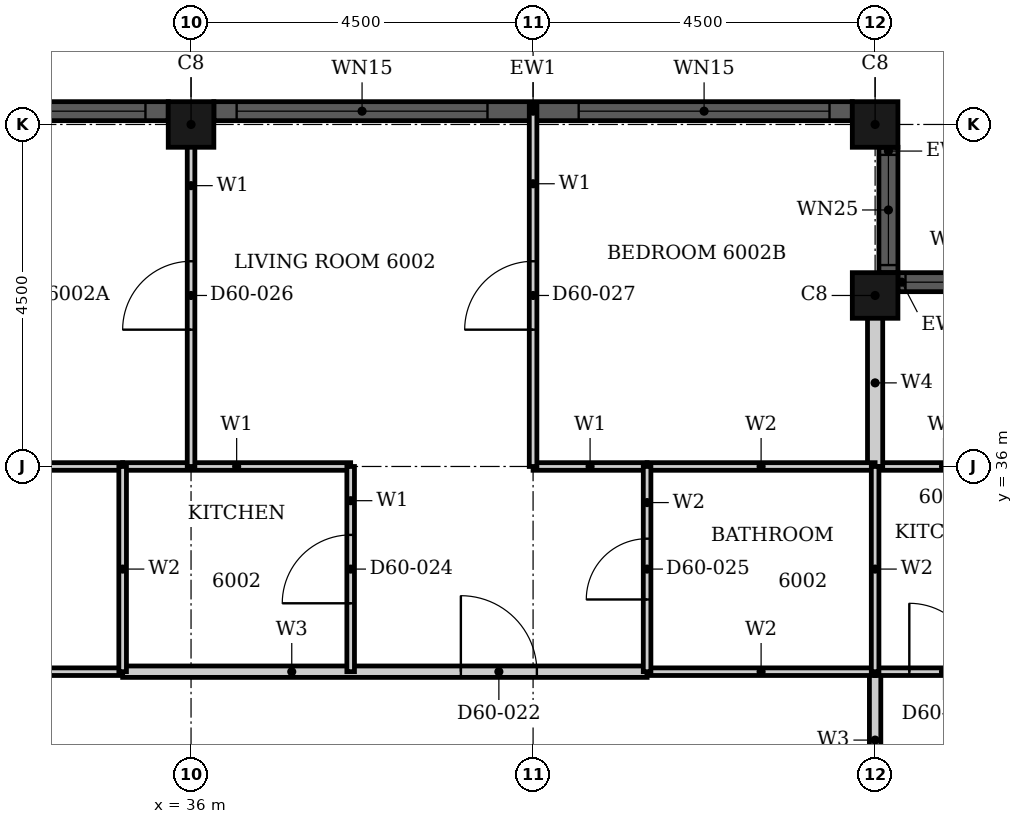
"""IFC4 building model, lengths in metres.
Left out: names, types, materials, properties, quantities, classifications, styles, units other than length and angle.
Written with IfcOpenShell. Run it as: python <this file> out.ifc"""

import sys

from ifc_helpers import new_model, si_unit, direction, frame, frame_2d, origin, origin_2d, place, context, subcontext, project, spatial, rectangle, hollow_rectangle, extrude, element, fill, save


model = new_model("IFC4")
c1 = context("Model", 3, precision=1e-05, world=origin(), true_north=direction((0.0, 1.0)))
c2 = subcontext(c1, "Body", "Model", "MODEL_VIEW")
j1 = project(units=[si_unit("LENGTHUNIT", "METRE"), si_unit("PLANEANGLEUNIT", "RADIAN")], contexts=[c1])
p1 = place(None, origin())
s1 = spatial("IfcSite", under=j1, at=p1, CompositionType="ELEMENT")
p2 = place(p1, origin())
s2 = spatial("IfcBuilding", under=s1, at=p2, CompositionType="ELEMENT")
p3 = place(p2, frame((0.0, 0.0, 237.9)))
s3 = spatial("IfcBuildingStorey", under=s2, at=p3, CompositionType="ELEMENT", Elevation=237.9)
for number, where, z_axis, x_axis in (
    (1, (45.0, 38.25, 0.0), (0.0, 0.0, 1.0), (1.0, 0.0, 0.0)),
    (2, (45.0, 40.5, 0.0), (0.0, 0.0, 1.0), (1.0, 0.0, 0.0)),
    (3, (36.0, 40.5, 0.0), (0.0, 0.0, 1.0), (1.0, 0.0, 0.0)),
):
    element("IfcColumn", number, at=place(p3, frame(where, z_axis=z_axis, x_axis=x_axis)), inside=s3, PredefinedType="COLUMN", context=c2, shape_type="SweptSolid", body=[
        extrude(hollow_rectangle(XDim=0.6, YDim=0.6, WallThickness=0.02, at=origin_2d()), origin(), (0.0, 0.0, 1.0), 3.7),
    ])
p4 = place(p3, frame((46.95, 38.425, 0.0), z_axis=(0.0, 0.0, 1.0), x_axis=(-1.0, 0.0, 0.0)))
e4 = element("IfcWall", 4, at=p4, inside=s3, PredefinedType="SOLIDWALL", context=c2, shape_type="SweptSolid", body=[
    extrude(rectangle(XDim=1.65, YDim=0.25, at=frame_2d((0.825, 0.0))), origin(), (0.0, 0.0, 1.0), 3.7),
])
p5 = place(p4, frame((0.1, 0.0, 0.9)))
e5 = element("IfcOpeningElement", 5, at=p5, cuts=e4, PredefinedType="OPENING", context=c2, shape_type="SweptSolid", body=[
    extrude(rectangle(XDim=1.45, YDim=1.85, at=frame_2d((0.725, 0.925))), frame((0.0, 0.135, 0.0), z_axis=(0.0, -1.0, 0.0), x_axis=(1.0, 0.0, 0.0)), (0.0, 0.0, 1.0), 0.27),
])
p6 = place(p3, frame((45.175, 38.55, 0.0), z_axis=(0.0, 0.0, 1.0), x_axis=(0.0, 1.0, 0.0)))
e6 = element("IfcWall", 6, at=p6, inside=s3, PredefinedType="SOLIDWALL", context=c2, shape_type="SweptSolid", body=[
    extrude(rectangle(XDim=1.65, YDim=0.25, at=frame_2d((0.825, 0.0))), origin(), (0.0, 0.0, 1.0), 3.7),
])
p7 = place(p6, frame((0.1, 0.0, 0.9)))
e7 = element("IfcOpeningElement", 7, at=p7, cuts=e6, PredefinedType="OPENING", context=c2, shape_type="SweptSolid", body=[
    extrude(rectangle(XDim=1.45, YDim=1.85, at=frame_2d((0.725, 0.925))), frame((0.0, 0.135, 0.0), z_axis=(0.0, -1.0, 0.0), x_axis=(1.0, 0.0, 0.0)), (0.0, 0.0, 1.0), 0.27),
])
p8 = place(p3, frame((44.7, 40.675, 0.0), z_axis=(0.0, 0.0, 1.0), x_axis=(-1.0, 0.0, 0.0)))
e8 = element("IfcWall", 8, at=p8, inside=s3, PredefinedType="SOLIDWALL", context=c2, shape_type="SweptSolid", body=[
    extrude(rectangle(XDim=8.4, YDim=0.25, at=frame_2d((4.2, 0.0))), origin(), (0.0, 0.0, 1.0), 3.7),
])
p9 = place(p8, frame((0.3, 0.0, 0.45)))
e9 = element("IfcOpeningElement", 9, at=p9, cuts=e8, PredefinedType="OPENING", context=c2, shape_type="SweptSolid", body=[
    extrude(rectangle(XDim=3.3, YDim=2.3, at=frame_2d((1.65, 1.15))), frame((0.0, 0.135, 0.0), z_axis=(0.0, -1.0, 0.0), x_axis=(1.0, 0.0, 0.0)), (0.0, 0.0, 1.0), 0.27),
])
p10 = place(p8, frame((4.8, 0.0, 0.45)))
e10 = element("IfcOpeningElement", 10, at=p10, cuts=e8, PredefinedType="OPENING", context=c2, shape_type="SweptSolid", body=[
    extrude(rectangle(XDim=3.3, YDim=2.3, at=frame_2d((1.65, 1.15))), frame((0.0, 0.135, 0.0), z_axis=(0.0, -1.0, 0.0), x_axis=(1.0, 0.0, 0.0)), (0.0, 0.0, 1.0), 0.27),
])
p11 = place(p3, frame((35.7, 40.675, 0.0), z_axis=(0.0, 0.0, 1.0), x_axis=(-1.0, 0.0, 0.0)))
e11 = element("IfcWall", 11, at=p11, inside=s3, PredefinedType="SOLIDWALL", context=c2, shape_type="SweptSolid", body=[
    extrude(rectangle(XDim=8.4, YDim=0.25, at=frame_2d((4.2, 0.0))), origin(), (0.0, 0.0, 1.0), 3.7),
])
p12 = place(p11, frame((0.3, 0.0, 0.45)))
e12 = element("IfcOpeningElement", 12, at=p12, cuts=e11, PredefinedType="OPENING", context=c2, shape_type="SweptSolid", body=[
    extrude(rectangle(XDim=3.3, YDim=2.3, at=frame_2d((1.65, 1.15))), frame((0.0, 0.135, 0.0), z_axis=(0.0, -1.0, 0.0), x_axis=(1.0, 0.0, 0.0)), (0.0, 0.0, 1.0), 0.27),
])
p13 = place(p11, frame((4.8, 0.0, 0.45)))
e13 = element("IfcOpeningElement", 13, at=p13, cuts=e11, PredefinedType="OPENING", context=c2, shape_type="SweptSolid", body=[
    extrude(rectangle(XDim=3.3, YDim=2.3, at=frame_2d((1.65, 1.15))), frame((0.0, 0.135, 0.0), z_axis=(0.0, -1.0, 0.0), x_axis=(1.0, 0.0, 0.0)), (0.0, 0.0, 1.0), 0.27),
])
p14 = place(p3, frame((35.1, 33.3, 0.0), z_axis=(0.0, 0.0, 1.0), x_axis=(1.0, 0.0, 0.0)))
e14 = element("IfcWall", 14, at=p14, inside=s3, PredefinedType="PARTITIONING", context=c2, shape_type="SweptSolid", body=[
    extrude(rectangle(XDim=6.9, YDim=0.15, at=frame_2d((3.45, 0.0))), origin(), (0.0, 0.0, 1.0), 3.4),
])
p15 = place(p14, frame((4.45, 0.0, 0.0)))
e15 = element("IfcOpeningElement", 15, at=p15, cuts=e14, PredefinedType="OPENING", context=c2, shape_type="SweptSolid", body=[
    extrude(rectangle(XDim=1.0, YDim=2.2, at=frame_2d((0.5, 1.1))), frame((0.0, 0.085, 0.0), z_axis=(0.0, -1.0, 0.0), x_axis=(1.0, 0.0, 0.0)), (0.0, 0.0, 1.0), 0.17),
])
p16 = place(p3, frame((45.0, 31.5, 0.0), z_axis=(0.0, 0.0, 1.0), x_axis=(0.0, 1.0, 0.0)))
e16 = element("IfcWall", 16, at=p16, inside=s3, PredefinedType="PARTITIONING", context=c2, shape_type="SweptSolid", body=[
    extrude(rectangle(XDim=1.8, YDim=0.15, at=frame_2d((0.9, 0.0))), origin(), (0.0, 0.0, 1.0), 3.4),
])
p17 = place(p3, frame((45.0, 33.3, 0.0), z_axis=(0.0, 0.0, 1.0), x_axis=(1.0, 0.0, 0.0)))
e17 = element("IfcWall", 17, at=p17, inside=s3, PredefinedType="PARTITIONING", context=c2, shape_type="SweptSolid", body=[
    extrude(rectangle(XDim=1.8, YDim=0.1, at=frame_2d((0.9, 0.0))), origin(), (0.0, 0.0, 1.0), 3.4),
])
p18 = place(p17, frame((0.45, 0.0, 0.0)))
e18 = element("IfcOpeningElement", 18, at=p18, cuts=e17, PredefinedType="OPENING", context=c2, shape_type="SweptSolid", body=[
    extrude(rectangle(XDim=0.9, YDim=2.1, at=frame_2d((0.45, 1.05))), frame((0.0, 0.06, 0.0), z_axis=(0.0, -1.0, 0.0), x_axis=(1.0, 0.0, 0.0)), (0.0, 0.0, 1.0), 0.12),
])
p19 = place(p3, frame((40.5, 36.0, 0.0), z_axis=(0.0, 0.0, 1.0), x_axis=(1.0, 0.0, 0.0)))
e19 = element("IfcWall", 19, at=p19, inside=s3, PredefinedType="PARTITIONING", context=c2, shape_type="SweptSolid", body=[
    extrude(rectangle(XDim=1.5, YDim=0.1, at=frame_2d((0.75, 0.0))), origin(), (0.0, 0.0, 1.0), 3.4),
])
p20 = place(p3, frame((35.1, 36.0, 0.0), z_axis=(0.0, 0.0, 1.0), x_axis=(1.0, 0.0, 0.0)))
e20 = element("IfcWall", 20, at=p20, inside=s3, PredefinedType="PARTITIONING", context=c2, shape_type="SweptSolid", body=[
    extrude(rectangle(XDim=3.0, YDim=0.1, at=frame_2d((1.5, 0.0))), origin(), (0.0, 0.0, 1.0), 3.4),
])
p21 = place(p3, frame((45.0, 36.0, 0.0), z_axis=(0.0, 0.0, 1.0), x_axis=(1.0, 0.0, 0.0)))
e21 = element("IfcWall", 21, at=p21, inside=s3, PredefinedType="PARTITIONING", context=c2, shape_type="SweptSolid", body=[
    extrude(rectangle(XDim=1.8, YDim=0.1, at=frame_2d((0.9, 0.0))), origin(), (0.0, 0.0, 1.0), 3.4),
])
p22 = place(p3, frame((36.0, 36.0, 0.0), z_axis=(0.0, 0.0, 1.0), x_axis=(0.0, 1.0, 0.0)))
e22 = element("IfcWall", 22, at=p22, inside=s3, PredefinedType="PARTITIONING", context=c2, shape_type="SweptSolid", body=[
    extrude(rectangle(XDim=4.69, YDim=0.1, at=frame_2d((2.345, 0.0))), origin(), (0.0, 0.0, 1.0), 3.4),
])
p23 = place(p22, frame((1.8, 0.0, 0.0)))
e23 = element("IfcOpeningElement", 23, at=p23, cuts=e22, PredefinedType="OPENING", context=c2, shape_type="SweptSolid", body=[
    extrude(rectangle(XDim=0.9, YDim=2.1, at=frame_2d((0.45, 1.05))), frame((0.0, 0.06, 0.0), z_axis=(0.0, -1.0, 0.0), x_axis=(1.0, 0.0, 0.0)), (0.0, 0.0, 1.0), 0.12),
])
p24 = place(p3, frame((38.1, 33.3, 0.0), z_axis=(0.0, 0.0, 1.0), x_axis=(0.0, 1.0, 0.0)))
e24 = element("IfcWall", 24, at=p24, inside=s3, PredefinedType="PARTITIONING", context=c2, shape_type="SweptSolid", body=[
    extrude(rectangle(XDim=2.7, YDim=0.1, at=frame_2d((1.35, 0.0))), origin(), (0.0, 0.0, 1.0), 3.4),
])
p25 = place(p24, frame((0.9, 0.0, 0.0)))
e25 = element("IfcOpeningElement", 25, at=p25, cuts=e24, PredefinedType="OPENING", context=c2, shape_type="SweptSolid", body=[
    extrude(rectangle(XDim=0.9, YDim=2.1, at=frame_2d((0.45, 1.05))), frame((0.0, 0.06, 0.0), z_axis=(0.0, -1.0, 0.0), x_axis=(1.0, 0.0, 0.0)), (0.0, 0.0, 1.0), 0.12),
])
p26 = place(p3, frame((40.5, 36.0, 0.0), z_axis=(0.0, 0.0, 1.0), x_axis=(0.0, 1.0, 0.0)))
e26 = element("IfcWall", 26, at=p26, inside=s3, PredefinedType="PARTITIONING", context=c2, shape_type="SweptSolid", body=[
    extrude(rectangle(XDim=4.74, YDim=0.1, at=frame_2d((2.37, 0.0))), origin(), (0.0, 0.0, 1.0), 3.4),
])
p27 = place(p26, frame((1.8, 0.0, 0.0)))
e27 = element("IfcOpeningElement", 27, at=p27, cuts=e26, PredefinedType="OPENING", context=c2, shape_type="SweptSolid", body=[
    extrude(rectangle(XDim=0.9, YDim=2.1, at=frame_2d((0.45, 1.05))), frame((0.0, 0.06, 0.0), z_axis=(0.0, -1.0, 0.0), x_axis=(1.0, 0.0, 0.0)), (0.0, 0.0, 1.0), 0.12),
])
p28 = place(p3, frame((45.0, 36.0, 0.0), z_axis=(0.0, 0.0, 1.0), x_axis=(0.0, 1.0, 0.0)))
e28 = element("IfcWall", 28, at=p28, inside=s3, PredefinedType="PARTITIONING", context=c2, shape_type="SweptSolid", body=[
    extrude(rectangle(XDim=2.2, YDim=0.2, at=frame_2d((1.1, 0.0))), origin(), (0.0, 0.0, 1.0), 3.4),
])
p29 = place(p3, frame((28.5, 33.3, 0.0), z_axis=(0.0, 0.0, 1.0), x_axis=(1.0, 0.0, 0.0)))
e29 = element("IfcWall", 29, at=p29, inside=s3, PredefinedType="PARTITIONING", context=c2, shape_type="SweptSolid", body=[
    extrude(rectangle(XDim=6.6, YDim=0.1, at=frame_2d((3.3, 0.0))), origin(), (0.0, 0.0, 1.0), 3.4),
])
p30 = place(p3, frame((42.0, 33.3, 0.0), z_axis=(0.0, 0.0, 1.0), x_axis=(1.0, 0.0, 0.0)))
e30 = element("IfcWall", 30, at=p30, inside=s3, PredefinedType="PARTITIONING", context=c2, shape_type="SweptSolid", body=[
    extrude(rectangle(XDim=3.0, YDim=0.1, at=frame_2d((1.5, 0.0))), origin(), (0.0, 0.0, 1.0), 3.4),
])
p31 = place(p3, frame((28.5, 36.0, 0.0), z_axis=(0.0, 0.0, 1.0), x_axis=(1.0, 0.0, 0.0)))
e31 = element("IfcWall", 31, at=p31, inside=s3, PredefinedType="PARTITIONING", context=c2, shape_type="SweptSolid", body=[
    extrude(rectangle(XDim=6.6, YDim=0.1, at=frame_2d((3.3, 0.0))), origin(), (0.0, 0.0, 1.0), 3.4),
])
p32 = place(p31, frame((4.4, 0.0, 0.0)))
e32 = element("IfcOpeningElement", 32, at=p32, cuts=e31, PredefinedType="OPENING", context=c2, shape_type="SweptSolid", body=[
    extrude(rectangle(XDim=0.8, YDim=2.1, at=frame_2d((0.4, 1.05))), frame((0.0, 0.06, 0.0), z_axis=(0.0, -1.0, 0.0), x_axis=(1.0, 0.0, 0.0)), (0.0, 0.0, 1.0), 0.12),
])
p33 = place(p3, frame((42.0, 36.0, 0.0), z_axis=(0.0, 0.0, 1.0), x_axis=(1.0, 0.0, 0.0)))
e33 = element("IfcWall", 33, at=p33, inside=s3, PredefinedType="PARTITIONING", context=c2, shape_type="SweptSolid", body=[
    extrude(rectangle(XDim=3.0, YDim=0.1, at=frame_2d((1.5, 0.0))), origin(), (0.0, 0.0, 1.0), 3.4),
])
p34 = place(p3, frame((35.1, 33.3, 0.0), z_axis=(0.0, 0.0, 1.0), x_axis=(0.0, 1.0, 0.0)))
e34 = element("IfcWall", 34, at=p34, inside=s3, PredefinedType="PARTITIONING", context=c2, shape_type="SweptSolid", body=[
    extrude(rectangle(XDim=2.7, YDim=0.1, at=frame_2d((1.35, 0.0))), origin(), (0.0, 0.0, 1.0), 3.4),
])
p35 = place(p3, frame((42.0, 33.3, 0.0), z_axis=(0.0, 0.0, 1.0), x_axis=(0.0, 1.0, 0.0)))
e35 = element("IfcWall", 35, at=p35, inside=s3, PredefinedType="PARTITIONING", context=c2, shape_type="SweptSolid", body=[
    extrude(rectangle(XDim=2.7, YDim=0.1, at=frame_2d((1.35, 0.0))), origin(), (0.0, 0.0, 1.0), 3.4),
])
p36 = place(p35, frame((0.95, 0.0, 0.0)))
e36 = element("IfcOpeningElement", 36, at=p36, cuts=e35, PredefinedType="OPENING", context=c2, shape_type="SweptSolid", body=[
    extrude(rectangle(XDim=0.8, YDim=2.1, at=frame_2d((0.4, 1.05))), frame((0.0, 0.06, 0.0), z_axis=(0.0, -1.0, 0.0), x_axis=(1.0, 0.0, 0.0)), (0.0, 0.0, 1.0), 0.12),
])
p37 = place(p3, frame((45.0, 33.3, 0.0), z_axis=(0.0, 0.0, 1.0), x_axis=(0.0, 1.0, 0.0)))
e37 = element("IfcWall", 37, at=p37, inside=s3, PredefinedType="PARTITIONING", context=c2, shape_type="SweptSolid", body=[
    extrude(rectangle(XDim=2.7, YDim=0.1, at=frame_2d((1.35, 0.0))), origin(), (0.0, 0.0, 1.0), 3.4),
])
p38 = place(p5, origin())
e38 = element("IfcWindow", 38, at=p38, inside=s3, PartitioningType="SINGLE_PANEL", PredefinedType="WINDOW", context=c2, shape_type="SweptSolid", body=[
    extrude(rectangle(XDim=1.45, YDim=1.85, at=frame_2d((0.725, 0.925))), frame((0.0, 0.03, 0.0), z_axis=(0.0, -1.0, 0.0), x_axis=(1.0, 0.0, 0.0)), (0.0, 0.0, 1.0), 0.06),
])
fill(e5, e38)
p39 = place(p7, origin())
e39 = element("IfcWindow", 39, at=p39, inside=s3, PartitioningType="SINGLE_PANEL", PredefinedType="WINDOW", context=c2, shape_type="SweptSolid", body=[
    extrude(rectangle(XDim=1.45, YDim=1.85, at=frame_2d((0.725, 0.925))), frame((0.0, 0.03, 0.0), z_axis=(0.0, -1.0, 0.0), x_axis=(1.0, 0.0, 0.0)), (0.0, 0.0, 1.0), 0.06),
])
fill(e7, e39)
p40 = place(p9, origin())
e40 = element("IfcWindow", 40, at=p40, inside=s3, PartitioningType="SINGLE_PANEL", PredefinedType="WINDOW", context=c2, shape_type="SweptSolid", body=[
    extrude(rectangle(XDim=3.3, YDim=2.3, at=frame_2d((1.65, 1.15))), frame((0.0, 0.03, 0.0), z_axis=(0.0, -1.0, 0.0), x_axis=(1.0, 0.0, 0.0)), (0.0, 0.0, 1.0), 0.06),
])
fill(e9, e40)
p41 = place(p10, origin())
e41 = element("IfcWindow", 41, at=p41, inside=s3, PartitioningType="SINGLE_PANEL", PredefinedType="WINDOW", context=c2, shape_type="SweptSolid", body=[
    extrude(rectangle(XDim=3.3, YDim=2.3, at=frame_2d((1.65, 1.15))), frame((0.0, 0.03, 0.0), z_axis=(0.0, -1.0, 0.0), x_axis=(1.0, 0.0, 0.0)), (0.0, 0.0, 1.0), 0.06),
])
fill(e10, e41)
p42 = place(p12, origin())
e42 = element("IfcWindow", 42, at=p42, inside=s3, PartitioningType="SINGLE_PANEL", PredefinedType="WINDOW", context=c2, shape_type="SweptSolid", body=[
    extrude(rectangle(XDim=3.3, YDim=2.3, at=frame_2d((1.65, 1.15))), frame((0.0, 0.03, 0.0), z_axis=(0.0, -1.0, 0.0), x_axis=(1.0, 0.0, 0.0)), (0.0, 0.0, 1.0), 0.06),
])
fill(e12, e42)
p43 = place(p15, origin())
e43 = element("IfcDoor", 43, at=p43, inside=s3, OperationType="SINGLE_SWING_LEFT", PredefinedType="DOOR", context=c2, shape_type="SweptSolid", body=[
    extrude(rectangle(XDim=1.0, YDim=2.2, at=frame_2d((0.5, 1.1))), frame((0.0, 0.025, 0.0), z_axis=(0.0, -1.0, 0.0), x_axis=(1.0, 0.0, 0.0)), (0.0, 0.0, 1.0), 0.05),
])
fill(e15, e43)
p44 = place(p25, origin())
e44 = element("IfcDoor", 44, at=p44, inside=s3, OperationType="SINGLE_SWING_RIGHT", PredefinedType="DOOR", context=c2, shape_type="SweptSolid", body=[
    extrude(rectangle(XDim=0.9, YDim=2.1, at=frame_2d((0.45, 1.05))), frame((0.0, 0.025, 0.0), z_axis=(0.0, -1.0, 0.0), x_axis=(1.0, 0.0, 0.0)), (0.0, 0.0, 1.0), 0.05),
])
fill(e25, e44)
p45 = place(p36, origin())
e45 = element("IfcDoor", 45, at=p45, inside=s3, OperationType="SINGLE_SWING_LEFT", PredefinedType="DOOR", context=c2, shape_type="SweptSolid", body=[
    extrude(rectangle(XDim=0.8, YDim=2.1, at=frame_2d((0.4, 1.05))), frame((0.0, 0.025, 0.0), z_axis=(0.0, -1.0, 0.0), x_axis=(1.0, 0.0, 0.0)), (0.0, 0.0, 1.0), 0.05),
])
fill(e36, e45)
p46 = place(p23, origin())
e46 = element("IfcDoor", 46, at=p46, inside=s3, OperationType="SINGLE_SWING_LEFT", PredefinedType="DOOR", context=c2, shape_type="SweptSolid", body=[
    extrude(rectangle(XDim=0.9, YDim=2.1, at=frame_2d((0.45, 1.05))), frame((0.0, 0.025, 0.0), z_axis=(0.0, -1.0, 0.0), x_axis=(1.0, 0.0, 0.0)), (0.0, 0.0, 1.0), 0.05),
])
fill(e23, e46)
p47 = place(p27, origin())
e47 = element("IfcDoor", 47, at=p47, inside=s3, OperationType="SINGLE_SWING_LEFT", PredefinedType="DOOR", context=c2, shape_type="SweptSolid", body=[
    extrude(rectangle(XDim=0.9, YDim=2.1, at=frame_2d((0.45, 1.05))), frame((0.0, 0.025, 0.0), z_axis=(0.0, -1.0, 0.0), x_axis=(1.0, 0.0, 0.0)), (0.0, 0.0, 1.0), 0.05),
])
fill(e27, e47)
p48 = place(p18, origin())
e48 = element("IfcDoor", 48, at=p48, inside=s3, OperationType="SINGLE_SWING_RIGHT", PredefinedType="DOOR", context=c2, shape_type="SweptSolid", body=[
    extrude(rectangle(XDim=0.9, YDim=2.1, at=frame_2d((0.45, 1.05))), frame((0.0, 0.025, 0.0), z_axis=(0.0, -1.0, 0.0), x_axis=(1.0, 0.0, 0.0)), (0.0, 0.0, 1.0), 0.05),
])
fill(e18, e48)
save(model, sys.argv[1])
